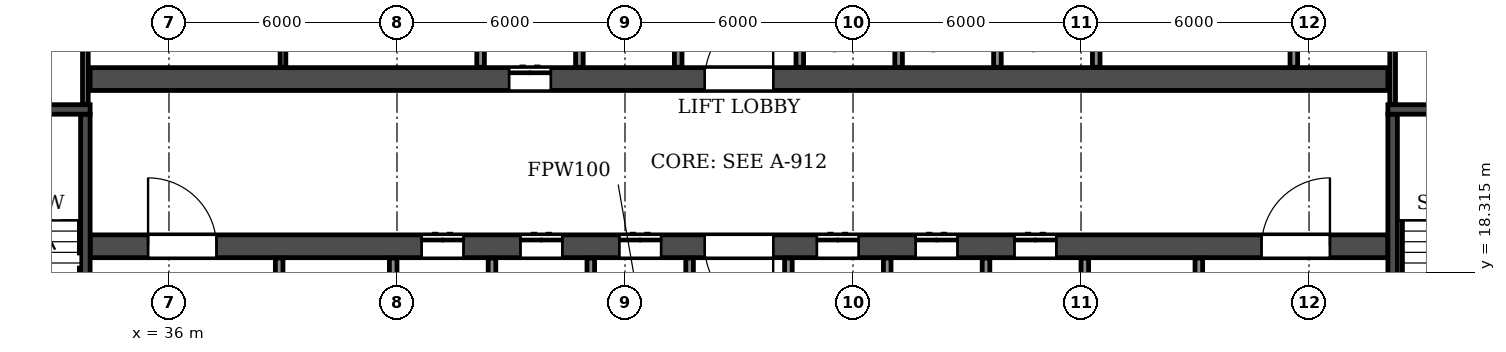
"""IFC4 building model, lengths in metres.
Left out: names, types, materials, properties, quantities, classifications, styles, units other than length and angle.
Written with IfcOpenShell. Run it as: python <this file> out.ifc"""

import sys

from ifc_helpers import new_model, si_unit, direction, frame, frame_2d, origin, place, context, subcontext, project, spatial, rectangle, extrude, element, fill, save


model = new_model("IFC4")
c1 = context("Model", 3, precision=1e-05, world=origin(), true_north=direction((0.0, 1.0)))
c2 = subcontext(c1, "Body", "Model", "MODEL_VIEW")
j1 = project(units=[si_unit("LENGTHUNIT", "METRE"), si_unit("PLANEANGLEUNIT", "RADIAN")], contexts=[c1])
p1 = place(None, origin())
s1 = spatial("IfcSite", under=j1, at=p1, CompositionType="ELEMENT")
p2 = place(p1, origin())
s2 = spatial("IfcBuilding", under=s1, at=p2, CompositionType="ELEMENT")
p3 = place(p2, frame((0.0, 0.0, 56.4)))
s3 = spatial("IfcBuildingStorey", under=s2, at=p3, CompositionType="ELEMENT", Elevation=56.4)
p4 = place(p3, frame((33.925, 19.0, 0.0), z_axis=(0.0, 0.0, 1.0), x_axis=(1.0, 0.0, 0.0)))
e1 = element("IfcWall", 1, at=p4, inside=s3, PredefinedType="SOLIDWALL", context=c2, shape_type="SweptSolid", body=[
    extrude(rectangle(XDim=34.15, YDim=0.6, at=frame_2d((17.075, 0.0))), origin(), (0.0, 0.0, 1.0), 3.05),
])
p5 = place(p4, frame((16.175, 0.0, 0.0)))
e2 = element("IfcOpeningElement", 2, at=p5, cuts=e1, PredefinedType="OPENING", context=c2, shape_type="SweptSolid", body=[
    extrude(rectangle(XDim=1.8, YDim=2.1, at=frame_2d((0.9, 1.05))), frame((0.0, 0.31, 0.0), z_axis=(0.0, -1.0, 0.0), x_axis=(1.0, 0.0, 0.0)), (0.0, 0.0, 1.0), 0.62),
])
p6 = place(p4, frame((1.525, 0.0, 0.0)))
e3 = element("IfcOpeningElement", 3, at=p6, cuts=e1, PredefinedType="OPENING", context=c2, shape_type="SweptSolid", body=[
    extrude(rectangle(XDim=1.8, YDim=2.1, at=frame_2d((0.9, 1.05))), frame((0.0, 0.31, 0.0), z_axis=(0.0, -1.0, 0.0), x_axis=(1.0, 0.0, 0.0)), (0.0, 0.0, 1.0), 0.62),
])
p7 = place(p4, frame((8.725, 0.0, 0.0)))
e4 = element("IfcOpeningElement", 4, at=p7, cuts=e1, PredefinedType="OPENING", context=c2, shape_type="SweptSolid", body=[
    extrude(rectangle(XDim=1.1, YDim=2.1, at=frame_2d((0.55, 1.05))), frame((0.0, 0.31, 0.0), z_axis=(0.0, -1.0, 0.0), x_axis=(1.0, 0.0, 0.0)), (0.0, 0.0, 1.0), 0.62),
])
p8 = place(p4, frame((11.325, 0.0, 0.0)))
e5 = element("IfcOpeningElement", 5, at=p8, cuts=e1, PredefinedType="OPENING", context=c2, shape_type="SweptSolid", body=[
    extrude(rectangle(XDim=1.1, YDim=2.1, at=frame_2d((0.55, 1.05))), frame((0.0, 0.31, 0.0), z_axis=(0.0, -1.0, 0.0), x_axis=(1.0, 0.0, 0.0)), (0.0, 0.0, 1.0), 0.62),
])
p9 = place(p4, frame((13.925, 0.0, 0.0)))
e6 = element("IfcOpeningElement", 6, at=p9, cuts=e1, PredefinedType="OPENING", context=c2, shape_type="SweptSolid", body=[
    extrude(rectangle(XDim=1.1, YDim=2.1, at=frame_2d((0.55, 1.05))), frame((0.0, 0.31, 0.0), z_axis=(0.0, -1.0, 0.0), x_axis=(1.0, 0.0, 0.0)), (0.0, 0.0, 1.0), 0.62),
])
p10 = place(p4, frame((19.125, 0.0, 0.0)))
e7 = element("IfcOpeningElement", 7, at=p10, cuts=e1, PredefinedType="OPENING", context=c2, shape_type="SweptSolid", body=[
    extrude(rectangle(XDim=1.1, YDim=2.1, at=frame_2d((0.55, 1.05))), frame((0.0, 0.31, 0.0), z_axis=(0.0, -1.0, 0.0), x_axis=(1.0, 0.0, 0.0)), (0.0, 0.0, 1.0), 0.62),
])
p11 = place(p4, frame((21.725, 0.0, 0.0)))
e8 = element("IfcOpeningElement", 8, at=p11, cuts=e1, PredefinedType="OPENING", context=c2, shape_type="SweptSolid", body=[
    extrude(rectangle(XDim=1.1, YDim=2.1, at=frame_2d((0.55, 1.05))), frame((0.0, 0.31, 0.0), z_axis=(0.0, -1.0, 0.0), x_axis=(1.0, 0.0, 0.0)), (0.0, 0.0, 1.0), 0.62),
])
p12 = place(p4, frame((24.325, 0.0, 0.0)))
e9 = element("IfcOpeningElement", 9, at=p12, cuts=e1, PredefinedType="OPENING", context=c2, shape_type="SweptSolid", body=[
    extrude(rectangle(XDim=1.1, YDim=2.1, at=frame_2d((0.55, 1.05))), frame((0.0, 0.31, 0.0), z_axis=(0.0, -1.0, 0.0), x_axis=(1.0, 0.0, 0.0)), (0.0, 0.0, 1.0), 0.62),
])
p13 = place(p4, frame((30.825, 0.0, 0.0)))
e10 = element("IfcOpeningElement", 10, at=p13, cuts=e1, PredefinedType="OPENING", context=c2, shape_type="SweptSolid", body=[
    extrude(rectangle(XDim=1.8, YDim=2.1, at=frame_2d((0.9, 1.05))), frame((0.0, 0.31, 0.0), z_axis=(0.0, -1.0, 0.0), x_axis=(1.0, 0.0, 0.0)), (0.0, 0.0, 1.0), 0.62),
])
p14 = place(p3, frame((33.925, 23.4, 0.0), z_axis=(0.0, 0.0, 1.0), x_axis=(1.0, 0.0, 0.0)))
e11 = element("IfcWall", 11, at=p14, inside=s3, PredefinedType="SOLIDWALL", context=c2, shape_type="SweptSolid", body=[
    extrude(rectangle(XDim=34.15, YDim=0.6, at=frame_2d((17.075, 0.0))), origin(), (0.0, 0.0, 1.0), 3.05),
])
p15 = place(p14, frame((16.175, 0.0, 0.0)))
e12 = element("IfcOpeningElement", 12, at=p15, cuts=e11, PredefinedType="OPENING", context=c2, shape_type="SweptSolid", body=[
    extrude(rectangle(XDim=1.8, YDim=2.1, at=frame_2d((0.9, 1.05))), frame((0.0, 0.31, 0.0), z_axis=(0.0, -1.0, 0.0), x_axis=(1.0, 0.0, 0.0)), (0.0, 0.0, 1.0), 0.62),
])
p16 = place(p14, frame((11.025, 0.0, 0.0)))
e13 = element("IfcOpeningElement", 13, at=p16, cuts=e11, PredefinedType="OPENING", context=c2, shape_type="SweptSolid", body=[
    extrude(rectangle(XDim=1.1, YDim=2.1, at=frame_2d((0.55, 1.05))), frame((0.0, 0.31, 0.0), z_axis=(0.0, -1.0, 0.0), x_axis=(1.0, 0.0, 0.0)), (0.0, 0.0, 1.0), 0.62),
])
p17 = place(p3, frame((33.8, 14.9, 0.0), z_axis=(0.0, 0.0, 1.0), x_axis=(0.0, 1.0, 0.0)))
e14 = element("IfcWall", 14, at=p17, inside=s3, PredefinedType="SOLIDWALL", context=c2, shape_type="SweptSolid", body=[
    extrude(rectangle(XDim=7.575, YDim=0.25, at=frame_2d((3.788, 0.0))), origin(), (0.0, 0.0, 1.0), 3.05),
])
p18 = place(p17, frame((0.4, 0.0, 0.0)))
e15 = element("IfcOpeningElement", 15, at=p18, cuts=e14, PredefinedType="OPENING", context=c2, shape_type="SweptSolid", body=[
    extrude(rectangle(XDim=1.0, YDim=2.1, at=frame_2d((0.5, 1.05))), frame((0.0, 0.135, 0.0), z_axis=(0.0, -1.0, 0.0), x_axis=(1.0, 0.0, 0.0)), (0.0, 0.0, 1.0), 0.27),
])
p19 = place(p3, frame((29.875, 22.6, 0.0), z_axis=(0.0, 0.0, 1.0), x_axis=(1.0, 0.0, 0.0)))
e16 = element("IfcWall", 16, at=p19, inside=s3, PredefinedType="SOLIDWALL", context=c2, shape_type="SweptSolid", body=[
    extrude(rectangle(XDim=4.05, YDim=0.25, at=frame_2d((2.025, 0.0))), origin(), (0.0, 0.0, 1.0), 3.05),
])
p20 = place(p3, frame((68.2, 14.9, 0.0), z_axis=(0.0, 0.0, 1.0), x_axis=(0.0, 1.0, 0.0)))
e17 = element("IfcWall", 17, at=p20, inside=s3, PredefinedType="SOLIDWALL", context=c2, shape_type="SweptSolid", body=[
    extrude(rectangle(XDim=7.575, YDim=0.25, at=frame_2d((3.788, 0.0))), origin(), (0.0, 0.0, 1.0), 3.05),
])
p21 = place(p20, frame((0.4, 0.0, 0.0)))
e18 = element("IfcOpeningElement", 18, at=p21, cuts=e17, PredefinedType="OPENING", context=c2, shape_type="SweptSolid", body=[
    extrude(rectangle(XDim=1.0, YDim=2.1, at=frame_2d((0.5, 1.05))), frame((0.0, 0.135, 0.0), z_axis=(0.0, -1.0, 0.0), x_axis=(1.0, 0.0, 0.0)), (0.0, 0.0, 1.0), 0.27),
])
p22 = place(p3, frame((68.075, 22.6, 0.0), z_axis=(0.0, 0.0, 1.0), x_axis=(1.0, 0.0, 0.0)))
e19 = element("IfcWall", 19, at=p22, inside=s3, PredefinedType="SOLIDWALL", context=c2, shape_type="SweptSolid", body=[
    extrude(rectangle(XDim=4.05, YDim=0.25, at=frame_2d((2.025, 0.0))), origin(), (0.0, 0.0, 1.0), 3.05),
])
p23 = place(p3, frame((39.0, 23.71, 0.0), z_axis=(0.0, 0.0, 1.0), x_axis=(0.0, 1.0, 0.0)))
e20 = element("IfcWall", 20, at=p23, inside=s3, PredefinedType="PARTITIONING", context=c2, shape_type="SweptSolid", body=[
    extrude(rectangle(XDim=3.78, YDim=0.15, at=frame_2d((1.89, 0.0))), origin(), (0.0, 0.0, 1.0), 3.05),
])
for number, where, z_axis, x_axis in (
    (21, (49.4, 23.71, 0.0), (0.0, 0.0, 1.0), (0.0, 1.0, 0.0)),
    (22, (65.6, 23.71, 0.0), (0.0, 0.0, 1.0), (0.0, 1.0, 0.0)),
):
    element("IfcWall", number, at=place(p3, frame(where, z_axis=z_axis, x_axis=x_axis)), inside=s3, PredefinedType="PARTITIONING", context=c2, shape_type="SweptSolid", body=[
        extrude(rectangle(XDim=3.78, YDim=0.2, at=frame_2d((1.89, 0.0))), origin(), (0.0, 0.0, 1.0), 3.05),
    ])
for number, where, z_axis, x_axis in (
    (23, (33.8, 22.735, 0.0), (0.0, 0.0, 1.0), (0.0, 1.0, 0.0)),
    (24, (68.2, 22.735, 0.0), (0.0, 0.0, 1.0), (0.0, 1.0, 0.0)),
):
    element("IfcWall", number, at=place(p3, frame(where, z_axis=z_axis, x_axis=x_axis)), inside=s3, PredefinedType="PARTITIONING", context=c2, shape_type="SweptSolid", body=[
        extrude(rectangle(XDim=4.755, YDim=0.15, at=frame_2d((2.377, 0.0))), origin(), (0.0, 0.0, 1.0), 3.05),
    ])
p24 = place(p3, frame((38.9, 14.91, 0.0), z_axis=(0.0, 0.0, 1.0), x_axis=(0.0, 1.0, 0.0)))
e25 = element("IfcWall", 25, at=p24, inside=s3, PredefinedType="PARTITIONING", context=c2, shape_type="SweptSolid", body=[
    extrude(rectangle(XDim=3.78, YDim=0.2, at=frame_2d((1.89, 0.0))), origin(), (0.0, 0.0, 1.0), 3.05),
])
p25 = place(p24, frame((1.34, 0.0, 0.0)))
e26 = element("IfcOpeningElement", 26, at=p25, cuts=e25, PredefinedType="OPENING", context=c2, shape_type="SweptSolid", body=[
    extrude(rectangle(XDim=1.1, YDim=2.1, at=frame_2d((0.55, 1.05))), frame((0.0, 0.11, 0.0), z_axis=(0.0, -1.0, 0.0), x_axis=(1.0, 0.0, 0.0)), (0.0, 0.0, 1.0), 0.22),
])
for number, where, z_axis, x_axis in (
    (27, (41.9, 14.91, 0.0), (0.0, 0.0, 1.0), (0.0, 1.0, 0.0)),
    (28, (44.2, 23.71, 0.0), (0.0, 0.0, 1.0), (0.0, 1.0, 0.0)),
):
    element("IfcWall", number, at=place(p3, frame(where, z_axis=z_axis, x_axis=x_axis)), inside=s3, PredefinedType="PARTITIONING", context=c2, shape_type="SweptSolid", body=[
        extrude(rectangle(XDim=3.78, YDim=0.2, at=frame_2d((1.89, 0.0))), origin(), (0.0, 0.0, 1.0), 3.05),
    ])
p26 = place(p3, frame((44.5, 16.3, 0.0), z_axis=(0.0, 0.0, 1.0), x_axis=(0.0, 1.0, 0.0)))
e29 = element("IfcWall", 29, at=p26, inside=s3, PredefinedType="PARTITIONING", context=c2, shape_type="SweptSolid", body=[
    extrude(rectangle(XDim=2.39, YDim=0.2, at=frame_2d((1.195, 0.0))), origin(), (0.0, 0.0, 1.0), 3.05),
])
p27 = place(p3, frame((46.8, 23.71, 0.0), z_axis=(0.0, 0.0, 1.0), x_axis=(0.0, 1.0, 0.0)))
e30 = element("IfcWall", 30, at=p27, inside=s3, PredefinedType="PARTITIONING", context=c2, shape_type="SweptSolid", body=[
    extrude(rectangle(XDim=3.78, YDim=0.2, at=frame_2d((1.89, 0.0))), origin(), (0.0, 0.0, 1.0), 3.05),
])
for number, where, z_axis, x_axis in (
    (31, (47.1, 16.3, 0.0), (0.0, 0.0, 1.0), (0.0, 1.0, 0.0)),
    (32, (49.7, 16.3, 0.0), (0.0, 0.0, 1.0), (0.0, 1.0, 0.0)),
    (33, (52.3, 16.3, 0.0), (0.0, 0.0, 1.0), (0.0, 1.0, 0.0)),
):
    element("IfcWall", number, at=place(p3, frame(where, z_axis=z_axis, x_axis=x_axis)), inside=s3, PredefinedType="PARTITIONING", context=c2, shape_type="SweptSolid", body=[
        extrude(rectangle(XDim=2.39, YDim=0.2, at=frame_2d((1.195, 0.0))), origin(), (0.0, 0.0, 1.0), 3.05),
    ])
p28 = place(p3, frame((52.6, 23.71, 0.0), z_axis=(0.0, 0.0, 1.0), x_axis=(0.0, 1.0, 0.0)))
e34 = element("IfcWall", 34, at=p28, inside=s3, PredefinedType="PARTITIONING", context=c2, shape_type="SweptSolid", body=[
    extrude(rectangle(XDim=2.39, YDim=0.2, at=frame_2d((1.195, 0.0))), origin(), (0.0, 0.0, 1.0), 3.05),
])
p29 = place(p3, frame((54.9, 16.3, 0.0), z_axis=(0.0, 0.0, 1.0), x_axis=(0.0, 1.0, 0.0)))
e35 = element("IfcWall", 35, at=p29, inside=s3, PredefinedType="PARTITIONING", context=c2, shape_type="SweptSolid", body=[
    extrude(rectangle(XDim=2.39, YDim=0.2, at=frame_2d((1.195, 0.0))), origin(), (0.0, 0.0, 1.0), 3.05),
])
p30 = place(p3, frame((55.2, 23.71, 0.0), z_axis=(0.0, 0.0, 1.0), x_axis=(0.0, 1.0, 0.0)))
e36 = element("IfcWall", 36, at=p30, inside=s3, PredefinedType="PARTITIONING", context=c2, shape_type="SweptSolid", body=[
    extrude(rectangle(XDim=2.39, YDim=0.2, at=frame_2d((1.195, 0.0))), origin(), (0.0, 0.0, 1.0), 3.05),
])
p31 = place(p3, frame((57.5, 16.3, 0.0), z_axis=(0.0, 0.0, 1.0), x_axis=(0.0, 1.0, 0.0)))
e37 = element("IfcWall", 37, at=p31, inside=s3, PredefinedType="PARTITIONING", context=c2, shape_type="SweptSolid", body=[
    extrude(rectangle(XDim=2.39, YDim=0.2, at=frame_2d((1.195, 0.0))), origin(), (0.0, 0.0, 1.0), 3.05),
])
p32 = place(p3, frame((57.8, 23.71, 0.0), z_axis=(0.0, 0.0, 1.0), x_axis=(0.0, 1.0, 0.0)))
e38 = element("IfcWall", 38, at=p32, inside=s3, PredefinedType="PARTITIONING", context=c2, shape_type="SweptSolid", body=[
    extrude(rectangle(XDim=2.39, YDim=0.2, at=frame_2d((1.195, 0.0))), origin(), (0.0, 0.0, 1.0), 3.05),
])
p33 = place(p3, frame((60.1, 14.91, 0.0), z_axis=(0.0, 0.0, 1.0), x_axis=(0.0, 1.0, 0.0)))
e39 = element("IfcWall", 39, at=p33, inside=s3, PredefinedType="PARTITIONING", context=c2, shape_type="SweptSolid", body=[
    extrude(rectangle(XDim=3.78, YDim=0.2, at=frame_2d((1.89, 0.0))), origin(), (0.0, 0.0, 1.0), 3.05),
])
p34 = place(p3, frame((60.4, 23.71, 0.0), z_axis=(0.0, 0.0, 1.0), x_axis=(0.0, 1.0, 0.0)))
e40 = element("IfcWall", 40, at=p34, inside=s3, PredefinedType="PARTITIONING", context=c2, shape_type="SweptSolid", body=[
    extrude(rectangle(XDim=2.39, YDim=0.2, at=frame_2d((1.195, 0.0))), origin(), (0.0, 0.0, 1.0), 3.05),
])
p35 = place(p3, frame((63.1, 14.91, 0.0), z_axis=(0.0, 0.0, 1.0), x_axis=(0.0, 1.0, 0.0)))
e41 = element("IfcWall", 41, at=p35, inside=s3, PredefinedType="PARTITIONING", context=c2, shape_type="SweptSolid", body=[
    extrude(rectangle(XDim=3.78, YDim=0.2, at=frame_2d((1.89, 0.0))), origin(), (0.0, 0.0, 1.0), 3.05),
])
p36 = place(p35, frame((1.34, 0.0, 0.0)))
e42 = element("IfcOpeningElement", 42, at=p36, cuts=e41, PredefinedType="OPENING", context=c2, shape_type="SweptSolid", body=[
    extrude(rectangle(XDim=1.1, YDim=2.1, at=frame_2d((0.55, 1.05))), frame((0.0, 0.11, 0.0), z_axis=(0.0, -1.0, 0.0), x_axis=(1.0, 0.0, 0.0)), (0.0, 0.0, 1.0), 0.22),
])
p37 = place(p15, origin())
e43 = element("IfcDoor", 43, at=p37, inside=s3, OperationType="DOUBLE_DOOR_SINGLE_SWING", PredefinedType="DOOR", context=c2, shape_type="SweptSolid", body=[
    extrude(rectangle(XDim=1.8, YDim=2.1, at=frame_2d((0.9, 1.05))), frame((0.0, 0.025, 0.0), z_axis=(0.0, -1.0, 0.0), x_axis=(1.0, 0.0, 0.0)), (0.0, 0.0, 1.0), 0.05),
])
fill(e12, e43)
p38 = place(p5, frame((1.8, 0.0, 0.0), z_axis=(0.0, 0.0, 1.0), x_axis=(-1.0, 0.0, 0.0)))
e44 = element("IfcDoor", 44, at=p38, inside=s3, OperationType="DOUBLE_DOOR_SINGLE_SWING", PredefinedType="DOOR", context=c2, shape_type="SweptSolid", body=[
    extrude(rectangle(XDim=1.8, YDim=2.1, at=frame_2d((0.9, 1.05))), frame((0.0, 0.025, 0.0), z_axis=(0.0, -1.0, 0.0), x_axis=(1.0, 0.0, 0.0)), (0.0, 0.0, 1.0), 0.05),
])
fill(e2, e44)
p39 = place(p6, origin())
e45 = element("IfcDoor", 45, at=p39, inside=s3, OperationType="DOUBLE_DOOR_SINGLE_SWING", PredefinedType="DOOR", context=c2, shape_type="SweptSolid", body=[
    extrude(rectangle(XDim=1.8, YDim=2.1, at=frame_2d((0.9, 1.05))), frame((0.0, 0.025, 0.0), z_axis=(0.0, -1.0, 0.0), x_axis=(1.0, 0.0, 0.0)), (0.0, 0.0, 1.0), 0.05),
])
fill(e3, e45)
p40 = place(p7, origin())
e46 = element("IfcDoor", 46, at=p40, inside=s3, OperationType="DOUBLE_DOOR_SLIDING", PredefinedType="DOOR", context=c2, shape_type="SweptSolid", body=[
    extrude(rectangle(XDim=1.1, YDim=2.1, at=frame_2d((0.55, 1.05))), frame((0.0, 0.025, 0.0), z_axis=(0.0, -1.0, 0.0), x_axis=(1.0, 0.0, 0.0)), (0.0, 0.0, 1.0), 0.05),
])
fill(e4, e46)
p41 = place(p16, origin())
e47 = element("IfcDoor", 47, at=p41, inside=s3, OperationType="DOUBLE_DOOR_SLIDING", PredefinedType="DOOR", context=c2, shape_type="SweptSolid", body=[
    extrude(rectangle(XDim=1.1, YDim=2.1, at=frame_2d((0.55, 1.05))), frame((0.0, 0.025, 0.0), z_axis=(0.0, -1.0, 0.0), x_axis=(1.0, 0.0, 0.0)), (0.0, 0.0, 1.0), 0.05),
])
fill(e13, e47)
p42 = place(p8, origin())
e48 = element("IfcDoor", 48, at=p42, inside=s3, OperationType="DOUBLE_DOOR_SLIDING", PredefinedType="DOOR", context=c2, shape_type="SweptSolid", body=[
    extrude(rectangle(XDim=1.1, YDim=2.1, at=frame_2d((0.55, 1.05))), frame((0.0, 0.025, 0.0), z_axis=(0.0, -1.0, 0.0), x_axis=(1.0, 0.0, 0.0)), (0.0, 0.0, 1.0), 0.05),
])
fill(e5, e48)
p43 = place(p9, origin())
e49 = element("IfcDoor", 49, at=p43, inside=s3, OperationType="DOUBLE_DOOR_SLIDING", PredefinedType="DOOR", context=c2, shape_type="SweptSolid", body=[
    extrude(rectangle(XDim=1.1, YDim=2.1, at=frame_2d((0.55, 1.05))), frame((0.0, 0.025, 0.0), z_axis=(0.0, -1.0, 0.0), x_axis=(1.0, 0.0, 0.0)), (0.0, 0.0, 1.0), 0.05),
])
fill(e6, e49)
p44 = place(p10, origin())
e50 = element("IfcDoor", 50, at=p44, inside=s3, OperationType="DOUBLE_DOOR_SLIDING", PredefinedType="DOOR", context=c2, shape_type="SweptSolid", body=[
    extrude(rectangle(XDim=1.1, YDim=2.1, at=frame_2d((0.55, 1.05))), frame((0.0, 0.025, 0.0), z_axis=(0.0, -1.0, 0.0), x_axis=(1.0, 0.0, 0.0)), (0.0, 0.0, 1.0), 0.05),
])
fill(e7, e50)
p45 = place(p11, origin())
e51 = element("IfcDoor", 51, at=p45, inside=s3, OperationType="DOUBLE_DOOR_SLIDING", PredefinedType="DOOR", context=c2, shape_type="SweptSolid", body=[
    extrude(rectangle(XDim=1.1, YDim=2.1, at=frame_2d((0.55, 1.05))), frame((0.0, 0.025, 0.0), z_axis=(0.0, -1.0, 0.0), x_axis=(1.0, 0.0, 0.0)), (0.0, 0.0, 1.0), 0.05),
])
fill(e8, e51)
p46 = place(p12, origin())
e52 = element("IfcDoor", 52, at=p46, inside=s3, OperationType="DOUBLE_DOOR_SLIDING", PredefinedType="DOOR", context=c2, shape_type="SweptSolid", body=[
    extrude(rectangle(XDim=1.1, YDim=2.1, at=frame_2d((0.55, 1.05))), frame((0.0, 0.025, 0.0), z_axis=(0.0, -1.0, 0.0), x_axis=(1.0, 0.0, 0.0)), (0.0, 0.0, 1.0), 0.05),
])
fill(e9, e52)
p47 = place(p13, origin())
e53 = element("IfcDoor", 53, at=p47, inside=s3, OperationType="DOUBLE_DOOR_SINGLE_SWING", PredefinedType="DOOR", context=c2, shape_type="SweptSolid", body=[
    extrude(rectangle(XDim=1.8, YDim=2.1, at=frame_2d((0.9, 1.05))), frame((0.0, 0.025, 0.0), z_axis=(0.0, -1.0, 0.0), x_axis=(1.0, 0.0, 0.0)), (0.0, 0.0, 1.0), 0.05),
])
fill(e10, e53)
save(model, sys.argv[1])
